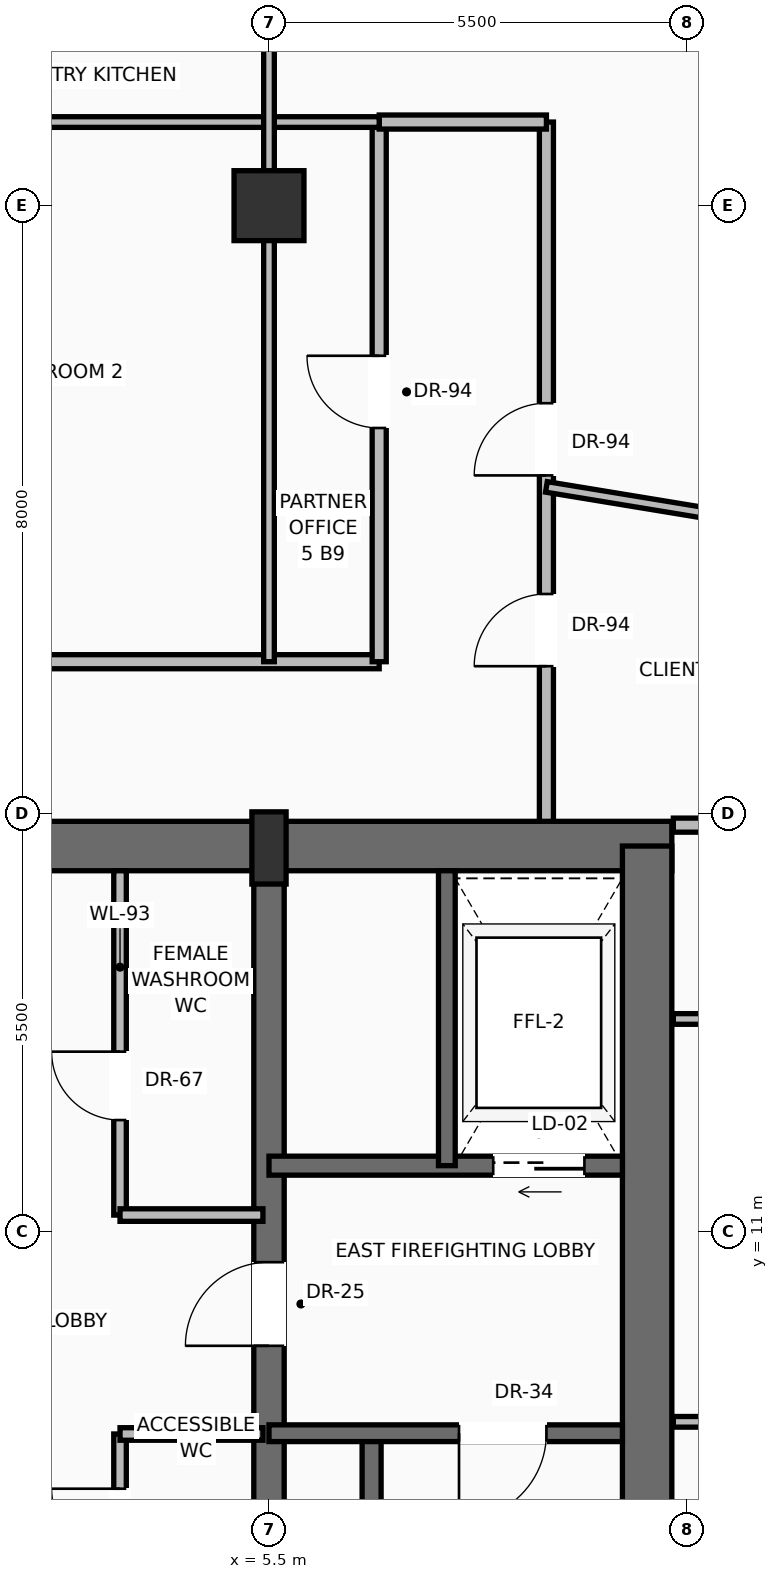
"""IFC4 building model, lengths in metres.
Left out: names, types, materials, properties, quantities, classifications, styles, units other than length and angle.
Written with IfcOpenShell. Run it as: python <this file> out.ifc"""

import sys

from ifc_helpers import new_model, si_unit, direction, frame, frame_2d, origin, origin_2d, place, context, subcontext, project, spatial, rectangle, extrude, source, transform, mapped, element, fill, save


model = new_model("IFC4")
c1 = context("Model", 3, precision=1e-05, world=origin(), true_north=direction((0.0, 1.0)))
c2 = subcontext(c1, "Body", "Model", "MODEL_VIEW")
j1 = project(units=[si_unit("LENGTHUNIT", "METRE"), si_unit("PLANEANGLEUNIT", "RADIAN")], contexts=[c1])
p1 = place(None, origin())
s1 = spatial("IfcSite", under=j1, at=p1, CompositionType="ELEMENT")
p2 = place(p1, origin())
s2 = spatial("IfcBuilding", under=s1, at=p2, CompositionType="ELEMENT")
p3 = place(p2, frame((0.0, 0.0, 178.4)))
s3 = spatial("IfcBuildingStorey", under=s2, at=p3, CompositionType="ELEMENT", Elevation=178.4)
p4 = place(p3, frame((-10.8, 16.075, 0.0), z_axis=(0.0, 0.0, 1.0), x_axis=(1.0, 0.0, 0.0)))
e1 = element("IfcWall", 1, at=p4, inside=s3, PredefinedType="SHEAR", context=c2, shape_type="SweptSolid", body=[
    extrude(rectangle(XDim=21.6, YDim=0.65, at=frame_2d((10.8, 0.0))), origin(), (0.0, 0.0, 1.0), 3.47),
])
p5 = place(p4, frame((3.37, 0.0, 0.0)))
e2 = element("IfcOpeningElement", 2, at=p5, cuts=e1, PredefinedType="OPENING", context=c2, shape_type="SweptSolid", body=[
    extrude(rectangle(XDim=1.3, YDim=2.3, at=frame_2d((0.65, 1.15))), frame((0.0, 0.335, 0.0), z_axis=(0.0, -1.0, 0.0), x_axis=(1.0, 0.0, 0.0)), (0.0, 0.0, 1.0), 0.67),
])
p6 = place(p4, frame((9.8, 0.0, 0.0)))
e3 = element("IfcOpeningElement", 3, at=p6, cuts=e1, PredefinedType="OPENING", context=c2, shape_type="SweptSolid", body=[
    extrude(rectangle(XDim=2.0, YDim=2.4, at=frame_2d((1.0, 1.2))), frame((0.0, 0.335, 0.0), z_axis=(0.0, -1.0, 0.0), x_axis=(1.0, 0.0, 0.0)), (0.0, 0.0, 1.0), 0.67),
])
p7 = place(p3, frame((10.475, 0.525, 0.0), z_axis=(0.0, 0.0, 1.0), x_axis=(0.0, 1.0, 0.0)))
e4 = element("IfcWall", 4, at=p7, inside=s3, PredefinedType="SHEAR", context=c2, shape_type="SweptSolid", body=[
    extrude(rectangle(XDim=15.55, YDim=0.65, at=frame_2d((7.775, 0.0))), origin(), (0.0, 0.0, 1.0), 3.47),
])
p8 = place(p3, frame((5.5, 0.525, 0.0), z_axis=(0.0, 0.0, 1.0), x_axis=(0.0, 1.0, 0.0)))
e5 = element("IfcWall", 5, at=p8, inside=s3, PredefinedType="SHEAR", context=c2, shape_type="SweptSolid", body=[
    extrude(rectangle(XDim=15.55, YDim=0.4, at=frame_2d((7.775, 0.0))), origin(), (0.0, 0.0, 1.0), 3.47),
])
p9 = place(p8, frame((8.975, 0.0, 0.0)))
e6 = element("IfcOpeningElement", 6, at=p9, cuts=e5, PredefinedType="OPENING", context=c2, shape_type="SweptSolid", body=[
    extrude(rectangle(XDim=1.1, YDim=2.2, at=frame_2d((0.55, 1.1))), frame((0.0, 0.21, 0.0), z_axis=(0.0, -1.0, 0.0), x_axis=(1.0, 0.0, 0.0)), (0.0, 0.0, 1.0), 0.42),
])
m1 = source(origin(), c2, "Body", "SweptSolid", [
    extrude(rectangle(XDim=0.45, YDim=0.95, at=origin_2d()), origin(), (0.0, 0.0, 1.0), 3.7),
])
p10 = place(p3, frame((5.5, 16.05, 0.0), z_axis=(0.0, 0.0, 1.0), x_axis=(1.0, 0.0, 0.0)))
e7 = element("IfcColumn", 7, at=p10, inside=s3, PredefinedType="PILASTER", context=c2, shape_type="MappedRepresentation", body=[
    mapped(m1, transform((0.0, 0.0, 0.0), scale=1.0)),
])
m2 = source(origin(), c2, "Body", "SweptSolid", [
    extrude(rectangle(XDim=0.92, YDim=0.92, at=origin_2d()), origin(), (0.0, 0.0, 1.0), 3.7),
])
p11 = place(p3, frame((5.5, 24.5, 0.0), z_axis=(0.0, 0.0, 1.0), x_axis=(1.0, 0.0, 0.0)))
e8 = element("IfcColumn", 8, at=p11, inside=s3, PredefinedType="COLUMN", context=c2, shape_type="MappedRepresentation", body=[
    mapped(m2, transform((0.0, 0.0, 0.0), scale=1.0)),
])
p12 = place(p3, frame((10.167, 32.463, 0.0), z_axis=(0.0, 0.0, 1.0), x_axis=(0.535575528783, -0.844487331444, 0.0)))
e9 = element("IfcWall", 9, at=p12, inside=s3, PredefinedType="SOLIDWALL", context=c2, shape_type="SweptSolid", body=[
    extrude(rectangle(XDim=18.76, YDim=0.28, at=frame_2d((9.38, 0.0))), origin(), (0.0, 0.0, 1.0), 3.05),
])
p13 = place(p12, frame((4.502, 0.0, 0.0)))
e10 = element("IfcOpeningElement", 10, at=p13, cuts=e9, PredefinedType="OPENING", context=c2, shape_type="SweptSolid", body=[
    extrude(rectangle(XDim=1.6, YDim=2.35, at=frame_2d((0.8, 1.175))), frame((0.0, 0.15, 0.0), z_axis=(0.0, -1.0, 0.0), x_axis=(1.0, 0.0, 0.0)), (0.0, 0.0, 1.0), 0.3),
])
p14 = place(p12, frame((12.757, 0.0, 0.9)))
e11 = element("IfcOpeningElement", 11, at=p14, cuts=e9, PredefinedType="OPENING", context=c2, shape_type="SweptSolid", body=[
    extrude(rectangle(XDim=1.55, YDim=1.85, at=frame_2d((0.775, 0.925))), frame((0.0, 0.15, 0.0), z_axis=(0.0, -1.0, 0.0), x_axis=(1.0, 0.0, 0.0)), (0.0, 0.0, 1.0), 0.3),
])
p15 = place(p3, frame((6.85, 0.85, 0.0), z_axis=(0.0, 0.0, 1.0), x_axis=(0.0, 1.0, 0.0)))
e12 = element("IfcWall", 12, at=p15, inside=s3, PredefinedType="SOLIDWALL", context=c2, shape_type="SweptSolid", body=[
    extrude(rectangle(XDim=7.5, YDim=0.25, at=frame_2d((3.75, 0.0))), origin(), (0.0, 0.0, 1.0), 3.47),
])
p16 = place(p3, frame((10.15, 8.35, 0.0), z_axis=(0.0, 0.0, 1.0), x_axis=(-1.0, 0.0, 0.0)))
e13 = element("IfcWall", 13, at=p16, inside=s3, PredefinedType="SOLIDWALL", context=c2, shape_type="SweptSolid", body=[
    extrude(rectangle(XDim=4.65, YDim=0.22, at=frame_2d((2.325, 0.0))), origin(), (0.0, 0.0, 1.0), 3.47),
])
p17 = place(p16, frame((1.0, 0.0, 0.0)))
e14 = element("IfcOpeningElement", 14, at=p17, cuts=e13, PredefinedType="OPENING", context=c2, shape_type="SweptSolid", body=[
    extrude(rectangle(XDim=1.15, YDim=2.2, at=frame_2d((0.575, 1.1))), frame((0.0, 0.12, 0.0), z_axis=(0.0, -1.0, 0.0), x_axis=(1.0, 0.0, 0.0)), (0.0, 0.0, 1.0), 0.24),
])
p18 = place(p3, frame((10.15, 11.87, 0.0), z_axis=(0.0, 0.0, 1.0), x_axis=(-1.0, 0.0, 0.0)))
e15 = element("IfcWall", 15, at=p18, inside=s3, PredefinedType="SOLIDWALL", context=c2, shape_type="SweptSolid", body=[
    extrude(rectangle(XDim=4.65, YDim=0.25, at=frame_2d((2.325, 0.0))), origin(), (0.0, 0.0, 1.0), 3.47),
])
p19 = place(p18, frame((0.5, 0.0, 0.0)))
e16 = element("IfcOpeningElement", 16, at=p19, cuts=e15, PredefinedType="OPENING", context=c2, shape_type="SweptSolid", body=[
    extrude(rectangle(XDim=1.2, YDim=2.25, at=frame_2d((0.6, 1.125))), frame((0.0, 0.135, 0.0), z_axis=(0.0, -1.0, 0.0), x_axis=(1.0, 0.0, 0.0)), (0.0, 0.0, 1.0), 0.27),
])
p20 = place(p3, frame((7.84, 11.87, 0.0), z_axis=(0.0, 0.0, 1.0), x_axis=(0.0, 1.0, 0.0)))
e17 = element("IfcWall", 17, at=p20, inside=s3, PredefinedType="SOLIDWALL", context=c2, shape_type="SweptSolid", body=[
    extrude(rectangle(XDim=3.88, YDim=0.22, at=frame_2d((1.94, 0.0))), origin(), (0.0, 0.0, 1.0), 3.47),
])
p21 = place(p3, frame((3.54, 6.0, 0.0), z_axis=(0.0, 0.0, 1.0), x_axis=(0.0, 1.0, 0.0)))
e18 = element("IfcWall", 18, at=p21, inside=s3, PredefinedType="PARTITIONING", context=c2, shape_type="SweptSolid", body=[
    extrude(rectangle(XDim=2.34, YDim=0.165, at=frame_2d((1.17, 0.0))), origin(), (0.0, 0.0, 1.0), 3.462),
])
p22 = place(p21, frame((0.72, 0.0, 0.0)))
e19 = element("IfcOpeningElement", 19, at=p22, cuts=e18, PredefinedType="OPENING", context=c2, shape_type="SweptSolid", body=[
    extrude(rectangle(XDim=0.9, YDim=2.1, at=frame_2d((0.45, 1.05))), frame((0.0, 0.093, 0.0), z_axis=(0.0, -1.0, 0.0), x_axis=(1.0, 0.0, 0.0)), (0.0, 0.0, 1.0), 0.185),
])
p23 = place(p3, frame((3.54, 8.34, 0.0), z_axis=(0.0, 0.0, 1.0), x_axis=(1.0, 0.0, 0.0)))
e20 = element("IfcWall", 20, at=p23, inside=s3, PredefinedType="PARTITIONING", context=c2, shape_type="SweptSolid", body=[
    extrude(rectangle(XDim=1.88, YDim=0.165, at=frame_2d((0.94, 0.0))), origin(), (0.0, 0.0, 1.0), 3.462),
])
p24 = place(p3, frame((3.54, 11.22, 0.0), z_axis=(0.0, 0.0, 1.0), x_axis=(0.0, 1.0, 0.0)))
e21 = element("IfcWall", 21, at=p24, inside=s3, PredefinedType="PARTITIONING", context=c2, shape_type="SweptSolid", body=[
    extrude(rectangle(XDim=4.53, YDim=0.165, at=frame_2d((2.265, 0.0))), origin(), (0.0, 0.0, 1.0), 3.462),
])
p25 = place(p24, frame((1.25, 0.0, 0.0)))
e22 = element("IfcOpeningElement", 22, at=p25, cuts=e21, PredefinedType="OPENING", context=c2, shape_type="SweptSolid", body=[
    extrude(rectangle(XDim=0.9, YDim=2.1, at=frame_2d((0.45, 1.05))), frame((0.0, 0.093, 0.0), z_axis=(0.0, -1.0, 0.0), x_axis=(1.0, 0.0, 0.0)), (0.0, 0.0, 1.0), 0.185),
])
p26 = place(p3, frame((3.54, 11.22, 0.0), z_axis=(0.0, 0.0, 1.0), x_axis=(1.0, 0.0, 0.0)))
e23 = element("IfcWall", 23, at=p26, inside=s3, PredefinedType="PARTITIONING", context=c2, shape_type="SweptSolid", body=[
    extrude(rectangle(XDim=1.88, YDim=0.165, at=frame_2d((0.94, 0.0))), origin(), (0.0, 0.0, 1.0), 3.462),
])
p27 = place(p3, frame((-7.25, 18.5, 0.0), z_axis=(0.0, 0.0, 1.0), x_axis=(1.0, 0.0, 0.0)))
e24 = element("IfcWall", 24, at=p27, inside=s3, PredefinedType="PARTITIONING", context=c2, shape_type="SweptSolid", body=[
    extrude(rectangle(XDim=14.2, YDim=0.185, at=frame_2d((7.1, 0.0))), origin(), (0.0, 0.0, 1.0), 2.846),
])
p28 = place(p27, frame((6.625, 0.0, 0.0)))
e25 = element("IfcOpeningElement", 25, at=p28, cuts=e24, PredefinedType="OPENING", context=c2, shape_type="SweptSolid", body=[
    extrude(rectangle(XDim=0.95, YDim=2.2, at=frame_2d((0.475, 1.1))), frame((0.0, 0.103, 0.0), z_axis=(0.0, -1.0, 0.0), x_axis=(1.0, 0.0, 0.0)), (0.0, 0.0, 1.0), 0.205),
])
p29 = place(p3, frame((6.95, 18.5, 0.0), z_axis=(0.0, 0.0, 1.0), x_axis=(0.0, 1.0, 0.0)))
e26 = element("IfcWall", 26, at=p29, inside=s3, PredefinedType="PARTITIONING", context=c2, shape_type="SweptSolid", body=[
    extrude(rectangle(XDim=7.1, YDim=0.185, at=frame_2d((3.55, 0.0))), origin(), (0.0, 0.0, 1.0), 2.846),
])
p30 = place(p29, frame((3.075, 0.0, 0.0)))
e27 = element("IfcOpeningElement", 27, at=p30, cuts=e26, PredefinedType="OPENING", context=c2, shape_type="SweptSolid", body=[
    extrude(rectangle(XDim=0.95, YDim=2.2, at=frame_2d((0.475, 1.1))), frame((0.0, 0.103, 0.0), z_axis=(0.0, -1.0, 0.0), x_axis=(1.0, 0.0, 0.0)), (0.0, 0.0, 1.0), 0.205),
])
p31 = place(p3, frame((9.15, 16.4, 0.0), z_axis=(0.0, 0.0, 1.0), x_axis=(0.0, 1.0, 0.0)))
e28 = element("IfcWall", 28, at=p31, inside=s3, PredefinedType="PARTITIONING", context=c2, shape_type="SweptSolid", body=[
    extrude(rectangle(XDim=9.2, YDim=0.185, at=frame_2d((4.6, 0.0))), origin(), (0.0, 0.0, 1.0), 2.846),
])
p32 = place(p31, frame((4.551, 0.0, 0.0)))
e29 = element("IfcOpeningElement", 29, at=p32, cuts=e28, PredefinedType="OPENING", context=c2, shape_type="SweptSolid", body=[
    extrude(rectangle(XDim=0.95, YDim=2.2, at=frame_2d((0.475, 1.1))), frame((0.0, 0.103, 0.0), z_axis=(0.0, -1.0, 0.0), x_axis=(1.0, 0.0, 0.0)), (0.0, 0.0, 1.0), 0.205),
])
p33 = place(p31, frame((2.041, 0.0, 0.0)))
e30 = element("IfcOpeningElement", 30, at=p33, cuts=e28, PredefinedType="OPENING", context=c2, shape_type="SweptSolid", body=[
    extrude(rectangle(XDim=0.95, YDim=2.2, at=frame_2d((0.475, 1.1))), frame((0.0, 0.103, 0.0), z_axis=(0.0, -1.0, 0.0), x_axis=(1.0, 0.0, 0.0)), (0.0, 0.0, 1.0), 0.205),
])
p34 = place(p3, frame((6.95, 25.6, 0.0), z_axis=(0.0, 0.0, 1.0), x_axis=(1.0, 0.0, 0.0)))
e31 = element("IfcWall", 31, at=p34, inside=s3, PredefinedType="PARTITIONING", context=c2, shape_type="SweptSolid", body=[
    extrude(rectangle(XDim=2.2, YDim=0.185, at=frame_2d((1.1, 0.0))), origin(), (0.0, 0.0, 1.0), 3.462),
])
p35 = place(p3, frame((10.82, 16.35, 0.0), z_axis=(0.0, 0.0, 1.0), x_axis=(1.0, 0.0, 0.0)))
e32 = element("IfcWall", 32, at=p35, inside=s3, PredefinedType="PARTITIONING", context=c2, shape_type="SweptSolid", body=[
    extrude(rectangle(XDim=9.719, YDim=0.185, at=frame_2d((4.86, 0.0))), origin(), (0.0, 0.0, 1.0), 3.462),
])
p36 = place(p35, frame((3.029, 0.0, 0.0)))
e33 = element("IfcOpeningElement", 33, at=p36, cuts=e32, PredefinedType="OPENING", context=c2, shape_type="SweptSolid", body=[
    extrude(rectangle(XDim=0.95, YDim=2.2, at=frame_2d((0.475, 1.1))), frame((0.0, 0.103, 0.0), z_axis=(0.0, -1.0, 0.0), x_axis=(1.0, 0.0, 0.0)), (0.0, 0.0, 1.0), 0.205),
])
p37 = place(p3, frame((-7.25, 25.6, 0.0), z_axis=(0.0, 0.0, 1.0), x_axis=(1.0, 0.0, 0.0)))
e34 = element("IfcWall", 34, at=p37, inside=s3, PredefinedType="PARTITIONING", context=c2, shape_type="SweptSolid", body=[
    extrude(rectangle(XDim=14.2, YDim=0.14, at=frame_2d((7.1, 0.0))), origin(), (0.0, 0.0, 1.0), 3.462),
])
p38 = place(p37, frame((6.768, 0.0, 0.0)))
e35 = element("IfcOpeningElement", 35, at=p38, cuts=e34, PredefinedType="OPENING", context=c2, shape_type="SweptSolid", body=[
    extrude(rectangle(XDim=0.95, YDim=2.2, at=frame_2d((0.475, 1.1))), frame((0.0, 0.08, 0.0), z_axis=(0.0, -1.0, 0.0), x_axis=(1.0, 0.0, 0.0)), (0.0, 0.0, 1.0), 0.16),
])
p39 = place(p3, frame((5.5, 18.5, 0.0), z_axis=(0.0, 0.0, 1.0), x_axis=(0.0, 1.0, 0.0)))
e36 = element("IfcWall", 36, at=p39, inside=s3, PredefinedType="PARTITIONING", context=c2, shape_type="SweptSolid", body=[
    extrude(rectangle(XDim=14.0, YDim=0.14, at=frame_2d((7.0, 0.0))), origin(), (0.0, 0.0, 1.0), 2.846),
])
p40 = place(p3, frame((10.82, 8.5, 0.0), z_axis=(0.0, 0.0, 1.0), x_axis=(1.0, 0.0, 0.0)))
e37 = element("IfcWall", 37, at=p40, inside=s3, PredefinedType="PARTITIONING", context=c2, shape_type="SweptSolid", body=[
    extrude(rectangle(XDim=14.698, YDim=0.14, at=frame_2d((7.349, 0.0))), origin(), (0.0, 0.0, 1.0), 3.462),
])
p41 = place(p40, frame((6.866, 0.0, 0.0)))
e38 = element("IfcOpeningElement", 38, at=p41, cuts=e37, PredefinedType="OPENING", context=c2, shape_type="SweptSolid", body=[
    extrude(rectangle(XDim=0.95, YDim=2.2, at=frame_2d((0.475, 1.1))), frame((0.0, 0.08, 0.0), z_axis=(0.0, -1.0, 0.0), x_axis=(1.0, 0.0, 0.0)), (0.0, 0.0, 1.0), 0.16),
])
p42 = place(p3, frame((10.82, 13.8, 0.0), z_axis=(0.0, 0.0, 1.0), x_axis=(1.0, 0.0, 0.0)))
e39 = element("IfcWall", 39, at=p42, inside=s3, PredefinedType="PARTITIONING", context=c2, shape_type="SweptSolid", body=[
    extrude(rectangle(XDim=11.336, YDim=0.14, at=frame_2d((5.668, 0.0))), origin(), (0.0, 0.0, 1.0), 3.462),
])
p43 = place(p42, frame((5.186, 0.0, 0.0)))
e40 = element("IfcOpeningElement", 40, at=p43, cuts=e39, PredefinedType="OPENING", context=c2, shape_type="SweptSolid", body=[
    extrude(rectangle(XDim=0.95, YDim=2.2, at=frame_2d((0.475, 1.1))), frame((0.0, 0.08, 0.0), z_axis=(0.0, -1.0, 0.0), x_axis=(1.0, 0.0, 0.0)), (0.0, 0.0, 1.0), 0.16),
])
p44 = place(p3, frame((9.15, 20.8, 0.0), z_axis=(0.0, 0.0, 1.0), x_axis=(0.986738202505, -0.162319806916, 0.0)))
e41 = element("IfcWall", 41, at=p44, inside=s3, PredefinedType="PARTITIONING", context=c2, shape_type="SweptSolid", body=[
    extrude(rectangle(XDim=9.694, YDim=0.14, at=frame_2d((4.847, 0.0))), origin(), (0.0, 0.0, 1.0), 3.049),
])
m3 = source(origin(), c2, "Body", "SweptSolid", [
    extrude(rectangle(XDim=1.15, YDim=2.2, at=frame_2d((0.575, 1.1))), frame((0.0, 0.025, 0.0), z_axis=(0.0, -1.0, 0.0), x_axis=(1.0, 0.0, 0.0)), (0.0, 0.0, 1.0), 0.05),
])
p45 = place(p17, origin())
e42 = element("IfcDoor", 42, at=p45, inside=s3, OperationType="SINGLE_SWING_RIGHT", PredefinedType="DOOR", context=c2, shape_type="MappedRepresentation", body=[
    mapped(m3, transform((0.0, 0.0, 0.0), scale=1.0)),
])
fill(e14, e42)
m4 = source(origin(), c2, "Body", "SweptSolid", [
    extrude(rectangle(XDim=1.1, YDim=2.2, at=frame_2d((0.55, 1.1))), frame((0.0, 0.025, 0.0), z_axis=(0.0, -1.0, 0.0), x_axis=(1.0, 0.0, 0.0)), (0.0, 0.0, 1.0), 0.05),
])
p46 = place(p9, origin())
e43 = element("IfcDoor", 43, at=p46, inside=s3, OperationType="SINGLE_SWING_LEFT", PredefinedType="DOOR", context=c2, shape_type="MappedRepresentation", body=[
    mapped(m4, transform((0.0, 0.0, 0.0), scale=1.0)),
])
fill(e6, e43)
m5 = source(origin(), c2, "Body", "SweptSolid", [
    extrude(rectangle(XDim=1.2, YDim=2.25, at=frame_2d((0.6, 1.125))), frame((0.0, 0.025, 0.0), z_axis=(0.0, -1.0, 0.0), x_axis=(1.0, 0.0, 0.0)), (0.0, 0.0, 1.0), 0.05),
])
p47 = place(p19, origin())
e44 = element("IfcDoor", 44, at=p47, inside=s3, OperationType="SLIDING_TO_RIGHT", PredefinedType="DOOR", context=c2, shape_type="MappedRepresentation", body=[
    mapped(m5, transform((0.0, 0.0, 0.0), scale=1.0)),
])
fill(e16, e44)
m6 = source(origin(), c2, "Body", "SweptSolid", [
    extrude(rectangle(XDim=0.9, YDim=2.1, at=frame_2d((0.45, 1.05))), frame((0.0, 0.025, 0.0), z_axis=(0.0, -1.0, 0.0), x_axis=(1.0, 0.0, 0.0)), (0.0, 0.0, 1.0), 0.05),
])
p48 = place(p22, origin())
e45 = element("IfcDoor", 45, at=p48, inside=s3, OperationType="SINGLE_SWING_RIGHT", PredefinedType="DOOR", context=c2, shape_type="MappedRepresentation", body=[
    mapped(m6, transform((0.0, 0.0, 0.0), scale=1.0)),
])
fill(e19, e45)
p49 = place(p25, origin())
e46 = element("IfcDoor", 46, at=p49, inside=s3, OperationType="SINGLE_SWING_RIGHT", PredefinedType="DOOR", context=c2, shape_type="MappedRepresentation", body=[
    mapped(m6, transform((0.0, 0.0, 0.0), scale=1.0)),
])
fill(e22, e46)
m7 = source(origin(), c2, "Body", "SweptSolid", [
    extrude(rectangle(XDim=0.95, YDim=2.2, at=frame_2d((0.475, 1.1))), frame((0.0, 0.025, 0.0), z_axis=(0.0, -1.0, 0.0), x_axis=(1.0, 0.0, 0.0)), (0.0, 0.0, 1.0), 0.05),
])
p50 = place(p32, origin())
e47 = element("IfcDoor", 47, at=p50, inside=s3, OperationType="SINGLE_SWING_LEFT", PredefinedType="DOOR", context=c2, shape_type="MappedRepresentation", body=[
    mapped(m7, transform((0.0, 0.0, 0.0), scale=1.0)),
])
fill(e29, e47)
p51 = place(p33, origin())
e48 = element("IfcDoor", 48, at=p51, inside=s3, OperationType="SINGLE_SWING_LEFT", PredefinedType="DOOR", context=c2, shape_type="MappedRepresentation", body=[
    mapped(m7, transform((0.0, 0.0, 0.0), scale=1.0)),
])
fill(e30, e48)
p52 = place(p30, origin())
e49 = element("IfcDoor", 49, at=p52, inside=s3, OperationType="SINGLE_SWING_RIGHT", PredefinedType="DOOR", context=c2, shape_type="MappedRepresentation", body=[
    mapped(m7, transform((0.0, 0.0, 0.0), scale=1.0)),
])
fill(e27, e49)
save(model, sys.argv[1])
